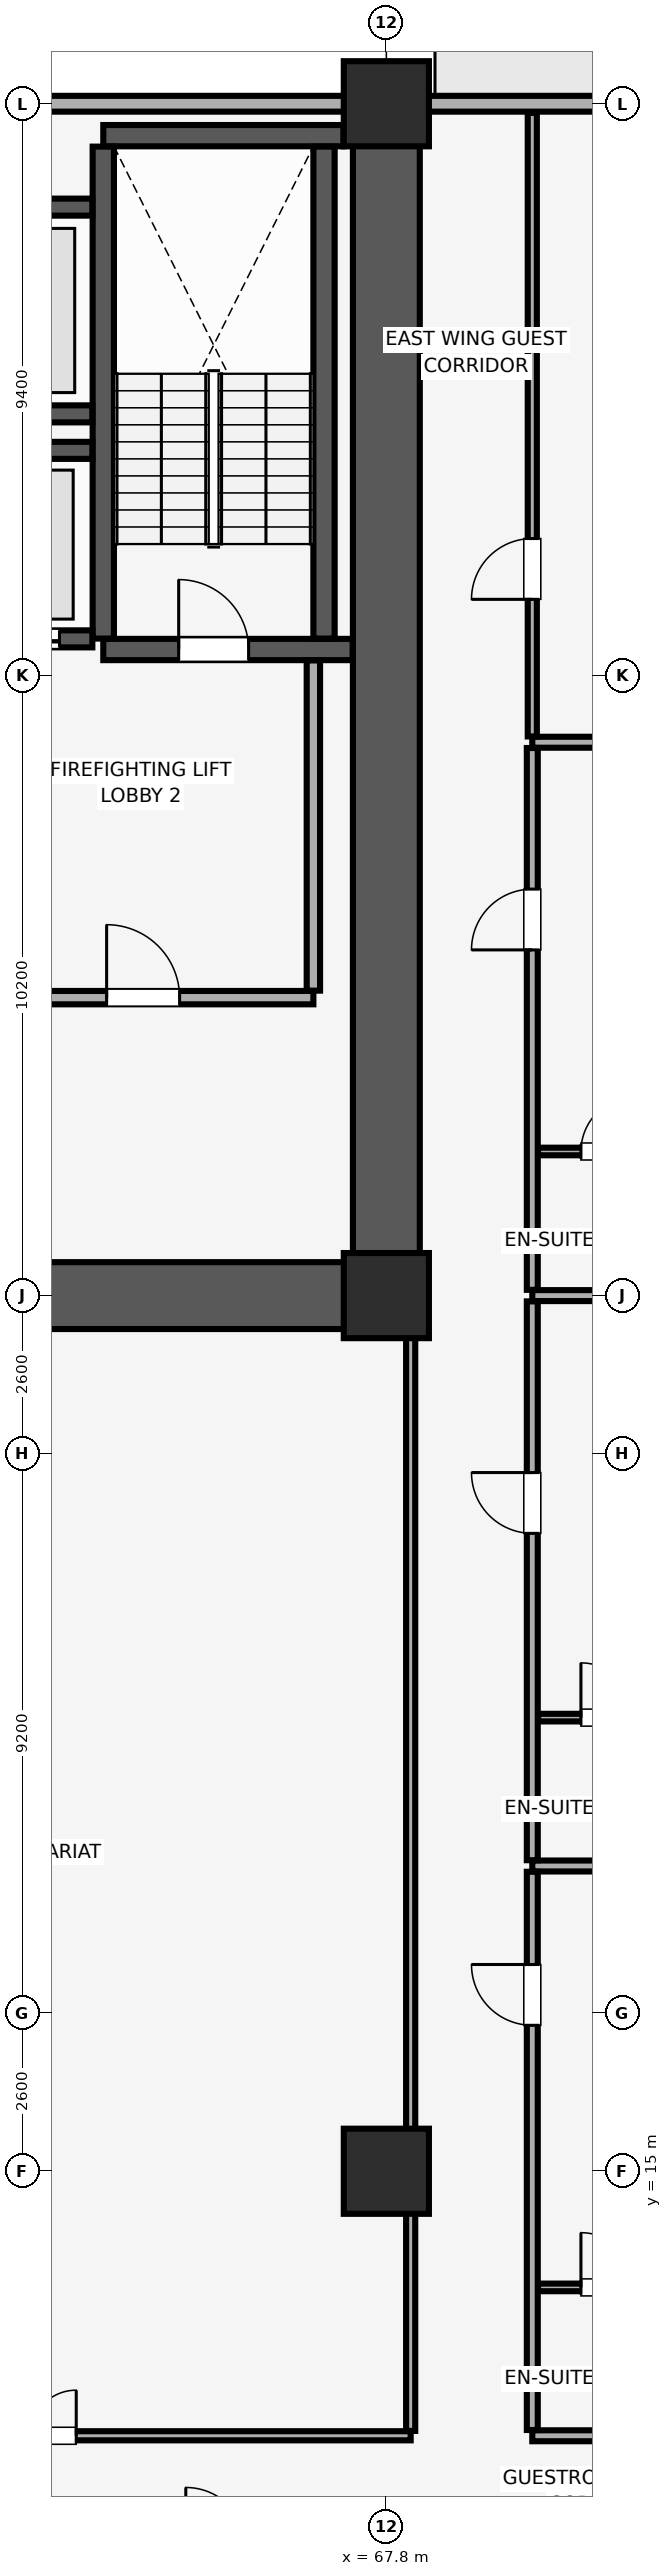
"""IFC4 building model, lengths in metres.
Left out: names, types, materials, properties, quantities, classifications, styles, units other than length and angle.
Written with IfcOpenShell. Run it as: python <this file> out.ifc"""

import sys

from ifc_helpers import new_model, si_unit, direction, frame, frame_2d, origin, origin_2d, place, context, subcontext, project, spatial, rectangle, extrude, element, fill, save


model = new_model("IFC4")
c1 = context("Model", 3, precision=1e-05, world=origin(), true_north=direction((0.0, 1.0)))
c2 = subcontext(c1, "Body", "Model", "MODEL_VIEW")
j1 = project(units=[si_unit("LENGTHUNIT", "METRE"), si_unit("PLANEANGLEUNIT", "RADIAN")], contexts=[c1])
p1 = place(None, origin())
s1 = spatial("IfcSite", under=j1, at=p1, CompositionType="ELEMENT")
p2 = place(p1, origin())
s2 = spatial("IfcBuilding", under=s1, at=p2, CompositionType="ELEMENT")
p3 = place(p2, frame((0.0, 0.0, 31.4)))
s3 = spatial("IfcBuildingStorey", under=s2, at=p3, CompositionType="ELEMENT", Elevation=31.4)
for number, where, z_axis, x_axis in (
    (1, (67.8, 15.0, 0.0), (0.0, 0.0, 1.0), (1.0, 0.0, 0.0)),
    (2, (67.8, 29.4, 0.0), (0.0, 0.0, 1.0), (1.0, 0.0, 0.0)),
    (3, (67.8, 49.0, 0.0), (0.0, 0.0, 1.0), (1.0, 0.0, 0.0)),
):
    element("IfcColumn", number, at=place(p3, frame(where, z_axis=z_axis, x_axis=x_axis)), inside=s3, PredefinedType="COLUMN", context=c2, shape_type="SweptSolid", body=[
        extrude(rectangle(XDim=1.4, YDim=1.4, at=origin_2d()), origin(), (0.0, 0.0, 1.0), 3.51),
    ])
p4 = place(p3, frame((79.8, 49.0, 0.0), z_axis=(0.0, 0.0, 1.0), x_axis=(-1.0, 0.0, 0.0)))
e4 = element("IfcWall", 4, at=p4, inside=s3, PredefinedType="SOLIDWALL", context=c2, shape_type="SweptSolid", body=[
    extrude(rectangle(XDim=75.6, YDim=0.26, at=frame_2d((37.8, 0.0))), origin(), (0.0, 0.0, 1.0), 2.56),
])
p5 = place(p4, frame((72.565, 0.0, 0.85)))
e5 = element("IfcOpeningElement", 5, at=p5, cuts=e4, PredefinedType="OPENING", context=c2, shape_type="SweptSolid", body=[
    extrude(rectangle(XDim=1.5, YDim=1.4, at=frame_2d((0.75, 0.7))), frame((0.0, 0.14, 0.0), z_axis=(0.0, -1.0, 0.0), x_axis=(1.0, 0.0, 0.0)), (0.0, 0.0, 1.0), 0.28),
])
p6 = place(p4, frame((67.45, 0.0, 0.85)))
e6 = element("IfcOpeningElement", 6, at=p6, cuts=e4, PredefinedType="OPENING", context=c2, shape_type="SweptSolid", body=[
    extrude(rectangle(XDim=1.5, YDim=1.4, at=frame_2d((0.75, 0.7))), frame((0.0, 0.14, 0.0), z_axis=(0.0, -1.0, 0.0), x_axis=(1.0, 0.0, 0.0)), (0.0, 0.0, 1.0), 0.28),
])
p7 = place(p4, frame((6.65, 0.0, 0.85)))
e7 = element("IfcOpeningElement", 7, at=p7, cuts=e4, PredefinedType="OPENING", context=c2, shape_type="SweptSolid", body=[
    extrude(rectangle(XDim=1.5, YDim=1.4, at=frame_2d((0.75, 0.7))), frame((0.0, 0.14, 0.0), z_axis=(0.0, -1.0, 0.0), x_axis=(1.0, 0.0, 0.0)), (0.0, 0.0, 1.0), 0.28),
])
p8 = place(p4, frame((1.535, 0.0, 0.85)))
e8 = element("IfcOpeningElement", 8, at=p8, cuts=e4, PredefinedType="OPENING", context=c2, shape_type="SweptSolid", body=[
    extrude(rectangle(XDim=1.5, YDim=1.4, at=frame_2d((0.75, 0.7))), frame((0.0, 0.14, 0.0), z_axis=(0.0, -1.0, 0.0), x_axis=(1.0, 0.0, 0.0)), (0.0, 0.0, 1.0), 0.28),
])
p9 = place(p4, frame((51.365, 0.0, 0.9)))
e9 = element("IfcOpeningElement", 9, at=p9, cuts=e4, PredefinedType="OPENING", context=c2, shape_type="SweptSolid", body=[
    extrude(rectangle(XDim=1.5, YDim=1.4, at=frame_2d((0.75, 0.7))), frame((0.0, 0.14, 0.0), z_axis=(0.0, -1.0, 0.0), x_axis=(1.0, 0.0, 0.0)), (0.0, 0.0, 1.0), 0.28),
])
p10 = place(p4, frame((46.0, 0.0, 0.9)))
e10 = element("IfcOpeningElement", 10, at=p10, cuts=e4, PredefinedType="OPENING", context=c2, shape_type="SweptSolid", body=[
    extrude(rectangle(XDim=1.5, YDim=1.4, at=frame_2d((0.75, 0.7))), frame((0.0, 0.14, 0.0), z_axis=(0.0, -1.0, 0.0), x_axis=(1.0, 0.0, 0.0)), (0.0, 0.0, 1.0), 0.28),
])
p11 = place(p4, frame((29.15, 0.0, 0.9)))
e11 = element("IfcOpeningElement", 11, at=p11, cuts=e4, PredefinedType="OPENING", context=c2, shape_type="SweptSolid", body=[
    extrude(rectangle(XDim=1.5, YDim=1.4, at=frame_2d((0.75, 0.7))), frame((0.0, 0.14, 0.0), z_axis=(0.0, -1.0, 0.0), x_axis=(1.0, 0.0, 0.0)), (0.0, 0.0, 1.0), 0.28),
])
p12 = place(p4, frame((23.485, 0.0, 0.9)))
e12 = element("IfcOpeningElement", 12, at=p12, cuts=e4, PredefinedType="OPENING", context=c2, shape_type="SweptSolid", body=[
    extrude(rectangle(XDim=1.5, YDim=1.4, at=frame_2d((0.75, 0.7))), frame((0.0, 0.14, 0.0), z_axis=(0.0, -1.0, 0.0), x_axis=(1.0, 0.0, 0.0)), (0.0, 0.0, 1.0), 0.28),
])
p13 = place(p3, frame((67.8, 29.4, 0.0), z_axis=(0.0, 0.0, 1.0), x_axis=(0.0, 1.0, 0.0)))
e13 = element("IfcWall", 13, at=p13, inside=s3, PredefinedType="SHEAR", context=c2, shape_type="SweptSolid", body=[
    extrude(rectangle(XDim=19.2, YDim=1.1, at=frame_2d((9.6, 0.0))), origin(), (0.0, 0.0, 1.0), 3.51),
])
p14 = place(p3, frame((60.4, 29.4, 0.0), z_axis=(0.0, 0.0, 1.0), x_axis=(1.0, 0.0, 0.0)))
e14 = element("IfcWall", 14, at=p14, inside=s3, PredefinedType="SHEAR", context=c2, shape_type="SweptSolid", body=[
    extrude(rectangle(XDim=6.845, YDim=1.1, at=frame_2d((3.423, 0.0))), origin(), (0.0, 0.0, 1.0), 3.51),
])
p15 = place(p3, frame((63.145, 40.025, 0.0), z_axis=(0.0, 0.0, 1.0), x_axis=(1.0, 0.0, 0.0)))
e15 = element("IfcWall", 15, at=p15, inside=s3, PredefinedType="SHEAR", context=c2, shape_type="SweptSolid", body=[
    extrude(rectangle(XDim=4.1, YDim=0.35, at=frame_2d((2.05, 0.0))), origin(), (0.0, 0.0, 1.0), 3.51),
])
p16 = place(p15, frame((1.24, 0.0, 0.0)))
e16 = element("IfcOpeningElement", 16, at=p16, cuts=e15, PredefinedType="OPENING", context=c2, shape_type="SweptSolid", body=[
    extrude(rectangle(XDim=1.15, YDim=2.15, at=frame_2d((0.575, 1.075))), frame((0.0, 0.185, 0.0), z_axis=(0.0, -1.0, 0.0), x_axis=(1.0, 0.0, 0.0)), (0.0, 0.0, 1.0), 0.37),
])
p17 = place(p3, frame((63.145, 48.475, 0.0), z_axis=(0.0, 0.0, 1.0), x_axis=(1.0, 0.0, 0.0)))
e17 = element("IfcWall", 17, at=p17, inside=s3, PredefinedType="SHEAR", context=c2, shape_type="SweptSolid", body=[
    extrude(rectangle(XDim=3.95, YDim=0.35, at=frame_2d((1.975, 0.0))), origin(), (0.0, 0.0, 1.0), 3.51),
])
for number, where, z_axis, x_axis in (
    (18, (63.145, 40.205, 0.0), (0.0, 0.0, 1.0), (0.0, 1.0, 0.0)),
    (19, (66.775, 40.205, 0.0), (0.0, 0.0, 1.0), (0.0, 1.0, 0.0)),
):
    element("IfcWall", number, at=place(p3, frame(where, z_axis=z_axis, x_axis=x_axis)), inside=s3, PredefinedType="SHEAR", context=c2, shape_type="SweptSolid", body=[
        extrude(rectangle(XDim=8.09, YDim=0.35, at=frame_2d((4.045, 0.0))), origin(), (0.0, 0.0, 1.0), 3.51),
    ])
p18 = place(p3, frame((60.55, 40.2, 0.0), z_axis=(0.0, 0.0, 1.0), x_axis=(1.0, 0.0, 0.0)))
e20 = element("IfcWall", 20, at=p18, inside=s3, PredefinedType="SHEAR", context=c2, shape_type="SweptSolid", body=[
    extrude(rectangle(XDim=2.415, YDim=0.28, at=frame_2d((1.208, 0.0))), origin(), (0.0, 0.0, 1.0), 3.51),
])
p19 = place(p18, frame((0.575, 0.0, 0.0)))
e21 = element("IfcOpeningElement", 21, at=p19, cuts=e20, PredefinedType="OPENING", context=c2, shape_type="SweptSolid", body=[
    extrude(rectangle(XDim=1.3, YDim=2.3, at=frame_2d((0.65, 1.15))), frame((0.0, 0.15, 0.0), z_axis=(0.0, -1.0, 0.0), x_axis=(1.0, 0.0, 0.0)), (0.0, 0.0, 1.0), 0.3),
])
for number, where, z_axis, x_axis in (
    (22, (60.55, 43.3, 0.0), (0.0, 0.0, 1.0), (1.0, 0.0, 0.0)),
    (23, (60.55, 43.9, 0.0), (0.0, 0.0, 1.0), (1.0, 0.0, 0.0)),
    (24, (60.55, 47.3, 0.0), (0.0, 0.0, 1.0), (1.0, 0.0, 0.0)),
):
    element("IfcWall", number, at=place(p3, frame(where, z_axis=z_axis, x_axis=x_axis)), inside=s3, PredefinedType="SHEAR", context=c2, shape_type="SweptSolid", body=[
        extrude(rectangle(XDim=2.415, YDim=0.28, at=frame_2d((1.208, 0.0))), origin(), (0.0, 0.0, 1.0), 3.51),
    ])
p20 = place(p3, frame((60.55, 34.3, 0.0), z_axis=(0.0, 0.0, 1.0), x_axis=(1.0, 0.0, 0.0)))
e25 = element("IfcWall", 25, at=p20, inside=s3, PredefinedType="PARTITIONING", context=c2, shape_type="SweptSolid", body=[
    extrude(rectangle(XDim=6.05, YDim=0.22, at=frame_2d((3.025, 0.0))), origin(), (0.0, 0.0, 1.0), 3.51),
])
p21 = place(p20, frame((2.65, 0.0, 0.0)))
e26 = element("IfcOpeningElement", 26, at=p21, cuts=e25, PredefinedType="OPENING", context=c2, shape_type="SweptSolid", body=[
    extrude(rectangle(XDim=1.2, YDim=2.15, at=frame_2d((0.6, 1.075))), frame((0.0, 0.12, 0.0), z_axis=(0.0, -1.0, 0.0), x_axis=(1.0, 0.0, 0.0)), (0.0, 0.0, 1.0), 0.24),
])
p22 = place(p3, frame((66.6, 34.415, 0.0), z_axis=(0.0, 0.0, 1.0), x_axis=(0.0, 1.0, 0.0)))
e27 = element("IfcWall", 27, at=p22, inside=s3, PredefinedType="PARTITIONING", context=c2, shape_type="SweptSolid", body=[
    extrude(rectangle(XDim=5.43, YDim=0.22, at=frame_2d((2.715, 0.0))), origin(), (0.0, 0.0, 1.0), 3.51),
])
p23 = place(p3, frame((54.28, 10.65, 0.0), z_axis=(0.0, 0.0, 1.0), x_axis=(1.0, 0.0, 0.0)))
e28 = element("IfcWall", 28, at=p23, inside=s3, PredefinedType="PARTITIONING", context=c2, shape_type="SweptSolid", body=[
    extrude(rectangle(XDim=13.92, YDim=0.15, at=frame_2d((6.96, 0.0))), origin(), (0.0, 0.0, 1.0), 3.51),
])
p24 = place(p23, frame((6.92, 0.0, 0.0)))
e29 = element("IfcOpeningElement", 29, at=p24, cuts=e28, PredefinedType="OPENING", context=c2, shape_type="SweptSolid", body=[
    extrude(rectangle(XDim=1.5, YDim=2.25, at=frame_2d((0.75, 1.125))), frame((0.0, 0.085, 0.0), z_axis=(0.0, -1.0, 0.0), x_axis=(1.0, 0.0, 0.0)), (0.0, 0.0, 1.0), 0.17),
])
p25 = place(p3, frame((68.2, 10.73, 0.0), z_axis=(0.0, 0.0, 1.0), x_axis=(0.0, 1.0, 0.0)))
e30 = element("IfcWall", 30, at=p25, inside=s3, PredefinedType="PARTITIONING", context=c2, shape_type="SweptSolid", body=[
    extrude(rectangle(XDim=18.66, YDim=0.15, at=frame_2d((9.33, 0.0))), origin(), (0.0, 0.0, 1.0), 3.51),
])
for number, where, z_axis, x_axis in (
    (31, (70.2, 10.65, 0.0), (0.0, 0.0, 1.0), (1.0, 0.0, 0.0)),
    (32, (70.2, 20.02, 0.0), (0.0, 0.0, 1.0), (1.0, 0.0, 0.0)),
):
    element("IfcWall", number, at=place(p3, frame(where, z_axis=z_axis, x_axis=x_axis)), inside=s3, PredefinedType="PARTITIONING", context=c2, shape_type="SweptSolid", body=[
        extrude(rectangle(XDim=13.65, YDim=0.18, at=frame_2d((6.825, 0.0))), origin(), (0.0, 0.0, 1.0), 3.51),
    ])
p26 = place(p3, frame((70.2, 10.745, 0.0), z_axis=(0.0, 0.0, 1.0), x_axis=(0.0, 1.0, 0.0)))
e33 = element("IfcWall", 33, at=p26, inside=s3, PredefinedType="PARTITIONING", context=c2, shape_type="SweptSolid", body=[
    extrude(rectangle(XDim=9.18, YDim=0.18, at=frame_2d((4.59, 0.0))), origin(), (0.0, 0.0, 1.0), 3.51),
])
p27 = place(p26, frame((6.655, 0.0, 0.0)))
e34 = element("IfcOpeningElement", 34, at=p27, cuts=e33, PredefinedType="OPENING", context=c2, shape_type="SweptSolid", body=[
    extrude(rectangle(XDim=1.0, YDim=2.15, at=frame_2d((0.5, 1.075))), frame((0.0, 0.1, 0.0), z_axis=(0.0, -1.0, 0.0), x_axis=(1.0, 0.0, 0.0)), (0.0, 0.0, 1.0), 0.2),
])
p28 = place(p3, frame((70.295, 13.09, 0.0), z_axis=(0.0, 0.0, 1.0), x_axis=(1.0, 0.0, 0.0)))
e35 = element("IfcWall", 35, at=p28, inside=s3, PredefinedType="PARTITIONING", context=c2, shape_type="SweptSolid", body=[
    extrude(rectangle(XDim=2.405, YDim=0.125, at=frame_2d((1.203, 0.0))), origin(), (0.0, 0.0, 1.0), 3.51),
])
p29 = place(p28, frame((0.705, 0.0, 0.0)))
e36 = element("IfcOpeningElement", 36, at=p29, cuts=e35, PredefinedType="OPENING", context=c2, shape_type="SweptSolid", body=[
    extrude(rectangle(XDim=0.9, YDim=2.1, at=frame_2d((0.45, 1.05))), frame((0.0, 0.073, 0.0), z_axis=(0.0, -1.0, 0.0), x_axis=(1.0, 0.0, 0.0)), (0.0, 0.0, 1.0), 0.145),
])
p30 = place(p3, frame((70.2, 29.4, 0.0), z_axis=(0.0, 0.0, 1.0), x_axis=(1.0, 0.0, 0.0)))
e37 = element("IfcWall", 37, at=p30, inside=s3, PredefinedType="PARTITIONING", context=c2, shape_type="SweptSolid", body=[
    extrude(rectangle(XDim=13.65, YDim=0.18, at=frame_2d((6.825, 0.0))), origin(), (0.0, 0.0, 1.0), 2.86),
])
p31 = place(p3, frame((70.2, 20.115, 0.0), z_axis=(0.0, 0.0, 1.0), x_axis=(0.0, 1.0, 0.0)))
e38 = element("IfcWall", 38, at=p31, inside=s3, PredefinedType="PARTITIONING", context=c2, shape_type="SweptSolid", body=[
    extrude(rectangle(XDim=9.19, YDim=0.18, at=frame_2d((4.595, 0.0))), origin(), (0.0, 0.0, 1.0), 3.51),
])
p32 = place(p31, frame((5.375, 0.0, 0.0)))
e39 = element("IfcOpeningElement", 39, at=p32, cuts=e38, PredefinedType="OPENING", context=c2, shape_type="SweptSolid", body=[
    extrude(rectangle(XDim=1.0, YDim=2.15, at=frame_2d((0.5, 1.075))), frame((0.0, 0.1, 0.0), z_axis=(0.0, -1.0, 0.0), x_axis=(1.0, 0.0, 0.0)), (0.0, 0.0, 1.0), 0.2),
])
p33 = place(p3, frame((70.295, 22.46, 0.0), z_axis=(0.0, 0.0, 1.0), x_axis=(1.0, 0.0, 0.0)))
e40 = element("IfcWall", 40, at=p33, inside=s3, PredefinedType="PARTITIONING", context=c2, shape_type="SweptSolid", body=[
    extrude(rectangle(XDim=2.405, YDim=0.125, at=frame_2d((1.203, 0.0))), origin(), (0.0, 0.0, 1.0), 3.51),
])
p34 = place(p33, frame((0.705, 0.0, 0.0)))
e41 = element("IfcOpeningElement", 41, at=p34, cuts=e40, PredefinedType="OPENING", context=c2, shape_type="SweptSolid", body=[
    extrude(rectangle(XDim=0.9, YDim=2.1, at=frame_2d((0.45, 1.05))), frame((0.0, 0.073, 0.0), z_axis=(0.0, -1.0, 0.0), x_axis=(1.0, 0.0, 0.0)), (0.0, 0.0, 1.0), 0.145),
])
p35 = place(p3, frame((70.2, 38.5, 0.0), z_axis=(0.0, 0.0, 1.0), x_axis=(1.0, 0.0, 0.0)))
e42 = element("IfcWall", 42, at=p35, inside=s3, PredefinedType="PARTITIONING", context=c2, shape_type="SweptSolid", body=[
    extrude(rectangle(XDim=13.65, YDim=0.18, at=frame_2d((6.825, 0.0))), origin(), (0.0, 0.0, 1.0), 3.51),
])
p36 = place(p3, frame((70.2, 29.495, 0.0), z_axis=(0.0, 0.0, 1.0), x_axis=(0.0, 1.0, 0.0)))
e43 = element("IfcWall", 43, at=p36, inside=s3, PredefinedType="PARTITIONING", context=c2, shape_type="SweptSolid", body=[
    extrude(rectangle(XDim=8.91, YDim=0.18, at=frame_2d((4.455, 0.0))), origin(), (0.0, 0.0, 1.0), 3.51),
])
p37 = place(p36, frame((5.59, 0.0, 0.0)))
e44 = element("IfcOpeningElement", 44, at=p37, cuts=e43, PredefinedType="OPENING", context=c2, shape_type="SweptSolid", body=[
    extrude(rectangle(XDim=1.0, YDim=2.15, at=frame_2d((0.5, 1.075))), frame((0.0, 0.1, 0.0), z_axis=(0.0, -1.0, 0.0), x_axis=(1.0, 0.0, 0.0)), (0.0, 0.0, 1.0), 0.2),
])
p38 = place(p3, frame((70.295, 31.77, 0.0), z_axis=(0.0, 0.0, 1.0), x_axis=(1.0, 0.0, 0.0)))
e45 = element("IfcWall", 45, at=p38, inside=s3, PredefinedType="PARTITIONING", context=c2, shape_type="SweptSolid", body=[
    extrude(rectangle(XDim=2.405, YDim=0.125, at=frame_2d((1.203, 0.0))), origin(), (0.0, 0.0, 1.0), 3.51),
])
p39 = place(p38, frame((0.705, 0.0, 0.0)))
e46 = element("IfcOpeningElement", 46, at=p39, cuts=e45, PredefinedType="OPENING", context=c2, shape_type="SweptSolid", body=[
    extrude(rectangle(XDim=0.9, YDim=2.1, at=frame_2d((0.45, 1.05))), frame((0.0, 0.073, 0.0), z_axis=(0.0, -1.0, 0.0), x_axis=(1.0, 0.0, 0.0)), (0.0, 0.0, 1.0), 0.145),
])
p40 = place(p3, frame((70.2, 38.595, 0.0), z_axis=(0.0, 0.0, 1.0), x_axis=(0.0, 1.0, 0.0)))
e47 = element("IfcWall", 47, at=p40, inside=s3, PredefinedType="PARTITIONING", context=c2, shape_type="SweptSolid", body=[
    extrude(rectangle(XDim=10.255, YDim=0.15, at=frame_2d((5.127, 0.0))), origin(), (0.0, 0.0, 1.0), 3.51),
])
p41 = place(p40, frame((2.255, 0.0, 0.0)))
e48 = element("IfcOpeningElement", 48, at=p41, cuts=e47, PredefinedType="OPENING", context=c2, shape_type="SweptSolid", body=[
    extrude(rectangle(XDim=1.0, YDim=2.15, at=frame_2d((0.5, 1.075))), frame((0.0, 0.085, 0.0), z_axis=(0.0, -1.0, 0.0), x_axis=(1.0, 0.0, 0.0)), (0.0, 0.0, 1.0), 0.17),
])
p42 = place(p16, origin())
e49 = element("IfcDoor", 49, at=p42, inside=s3, OperationType="SINGLE_SWING_LEFT", PredefinedType="DOOR", context=c2, shape_type="SweptSolid", body=[
    extrude(rectangle(XDim=1.15, YDim=2.15, at=frame_2d((0.575, 1.075))), frame((0.0, 0.025, 0.0), z_axis=(0.0, -1.0, 0.0), x_axis=(1.0, 0.0, 0.0)), (0.0, 0.0, 1.0), 0.05),
])
fill(e16, e49)
p43 = place(p19, origin())
e50 = element("IfcDoor", 50, at=p43, inside=s3, OperationType="DOUBLE_DOOR_SLIDING", PredefinedType="DOOR", context=c2, shape_type="SweptSolid", body=[
    extrude(rectangle(XDim=1.3, YDim=2.3, at=frame_2d((0.65, 1.15))), frame((0.0, 0.025, 0.0), z_axis=(0.0, -1.0, 0.0), x_axis=(1.0, 0.0, 0.0)), (0.0, 0.0, 1.0), 0.05),
])
fill(e21, e50)
p44 = place(p21, origin())
e51 = element("IfcDoor", 51, at=p44, inside=s3, OperationType="SINGLE_SWING_LEFT", PredefinedType="DOOR", context=c2, shape_type="SweptSolid", body=[
    extrude(rectangle(XDim=1.2, YDim=2.15, at=frame_2d((0.6, 1.075))), frame((0.0, 0.025, 0.0), z_axis=(0.0, -1.0, 0.0), x_axis=(1.0, 0.0, 0.0)), (0.0, 0.0, 1.0), 0.05),
])
fill(e26, e51)
p45 = place(p24, origin())
e52 = element("IfcDoor", 52, at=p45, inside=s3, OperationType="DOUBLE_DOOR_SINGLE_SWING", PredefinedType="DOOR", context=c2, shape_type="SweptSolid", body=[
    extrude(rectangle(XDim=1.5, YDim=2.25, at=frame_2d((0.75, 1.125))), frame((0.0, 0.025, 0.0), z_axis=(0.0, -1.0, 0.0), x_axis=(1.0, 0.0, 0.0)), (0.0, 0.0, 1.0), 0.05),
])
fill(e29, e52)
p46 = place(p27, origin())
e53 = element("IfcDoor", 53, at=p46, inside=s3, OperationType="SINGLE_SWING_RIGHT", PredefinedType="DOOR", context=c2, shape_type="SweptSolid", body=[
    extrude(rectangle(XDim=1.0, YDim=2.15, at=frame_2d((0.5, 1.075))), frame((0.0, 0.025, 0.0), z_axis=(0.0, -1.0, 0.0), x_axis=(1.0, 0.0, 0.0)), (0.0, 0.0, 1.0), 0.05),
])
fill(e34, e53)
p47 = place(p29, origin())
e54 = element("IfcDoor", 54, at=p47, inside=s3, OperationType="SINGLE_SWING_LEFT", PredefinedType="DOOR", context=c2, shape_type="SweptSolid", body=[
    extrude(rectangle(XDim=0.9, YDim=2.1, at=frame_2d((0.45, 1.05))), frame((0.0, 0.025, 0.0), z_axis=(0.0, -1.0, 0.0), x_axis=(1.0, 0.0, 0.0)), (0.0, 0.0, 1.0), 0.05),
])
fill(e36, e54)
p48 = place(p32, origin())
e55 = element("IfcDoor", 55, at=p48, inside=s3, OperationType="SINGLE_SWING_RIGHT", PredefinedType="DOOR", context=c2, shape_type="SweptSolid", body=[
    extrude(rectangle(XDim=1.0, YDim=2.15, at=frame_2d((0.5, 1.075))), frame((0.0, 0.025, 0.0), z_axis=(0.0, -1.0, 0.0), x_axis=(1.0, 0.0, 0.0)), (0.0, 0.0, 1.0), 0.05),
])
fill(e39, e55)
p49 = place(p34, origin())
e56 = element("IfcDoor", 56, at=p49, inside=s3, OperationType="SINGLE_SWING_LEFT", PredefinedType="DOOR", context=c2, shape_type="SweptSolid", body=[
    extrude(rectangle(XDim=0.9, YDim=2.1, at=frame_2d((0.45, 1.05))), frame((0.0, 0.025, 0.0), z_axis=(0.0, -1.0, 0.0), x_axis=(1.0, 0.0, 0.0)), (0.0, 0.0, 1.0), 0.05),
])
fill(e41, e56)
p50 = place(p37, origin())
e57 = element("IfcDoor", 57, at=p50, inside=s3, OperationType="SINGLE_SWING_LEFT", PredefinedType="DOOR", context=c2, shape_type="SweptSolid", body=[
    extrude(rectangle(XDim=1.0, YDim=2.15, at=frame_2d((0.5, 1.075))), frame((0.0, 0.025, 0.0), z_axis=(0.0, -1.0, 0.0), x_axis=(1.0, 0.0, 0.0)), (0.0, 0.0, 1.0), 0.05),
])
fill(e44, e57)
p51 = place(p39, origin())
e58 = element("IfcDoor", 58, at=p51, inside=s3, OperationType="SINGLE_SWING_RIGHT", PredefinedType="DOOR", context=c2, shape_type="SweptSolid", body=[
    extrude(rectangle(XDim=0.9, YDim=2.1, at=frame_2d((0.45, 1.05))), frame((0.0, 0.025, 0.0), z_axis=(0.0, -1.0, 0.0), x_axis=(1.0, 0.0, 0.0)), (0.0, 0.0, 1.0), 0.05),
])
fill(e46, e58)
p52 = place(p41, origin())
e59 = element("IfcDoor", 59, at=p52, inside=s3, OperationType="SINGLE_SWING_LEFT", PredefinedType="DOOR", context=c2, shape_type="SweptSolid", body=[
    extrude(rectangle(XDim=1.0, YDim=2.15, at=frame_2d((0.5, 1.075))), frame((0.0, 0.025, 0.0), z_axis=(0.0, -1.0, 0.0), x_axis=(1.0, 0.0, 0.0)), (0.0, 0.0, 1.0), 0.05),
])
fill(e48, e59)
save(model, sys.argv[1])
